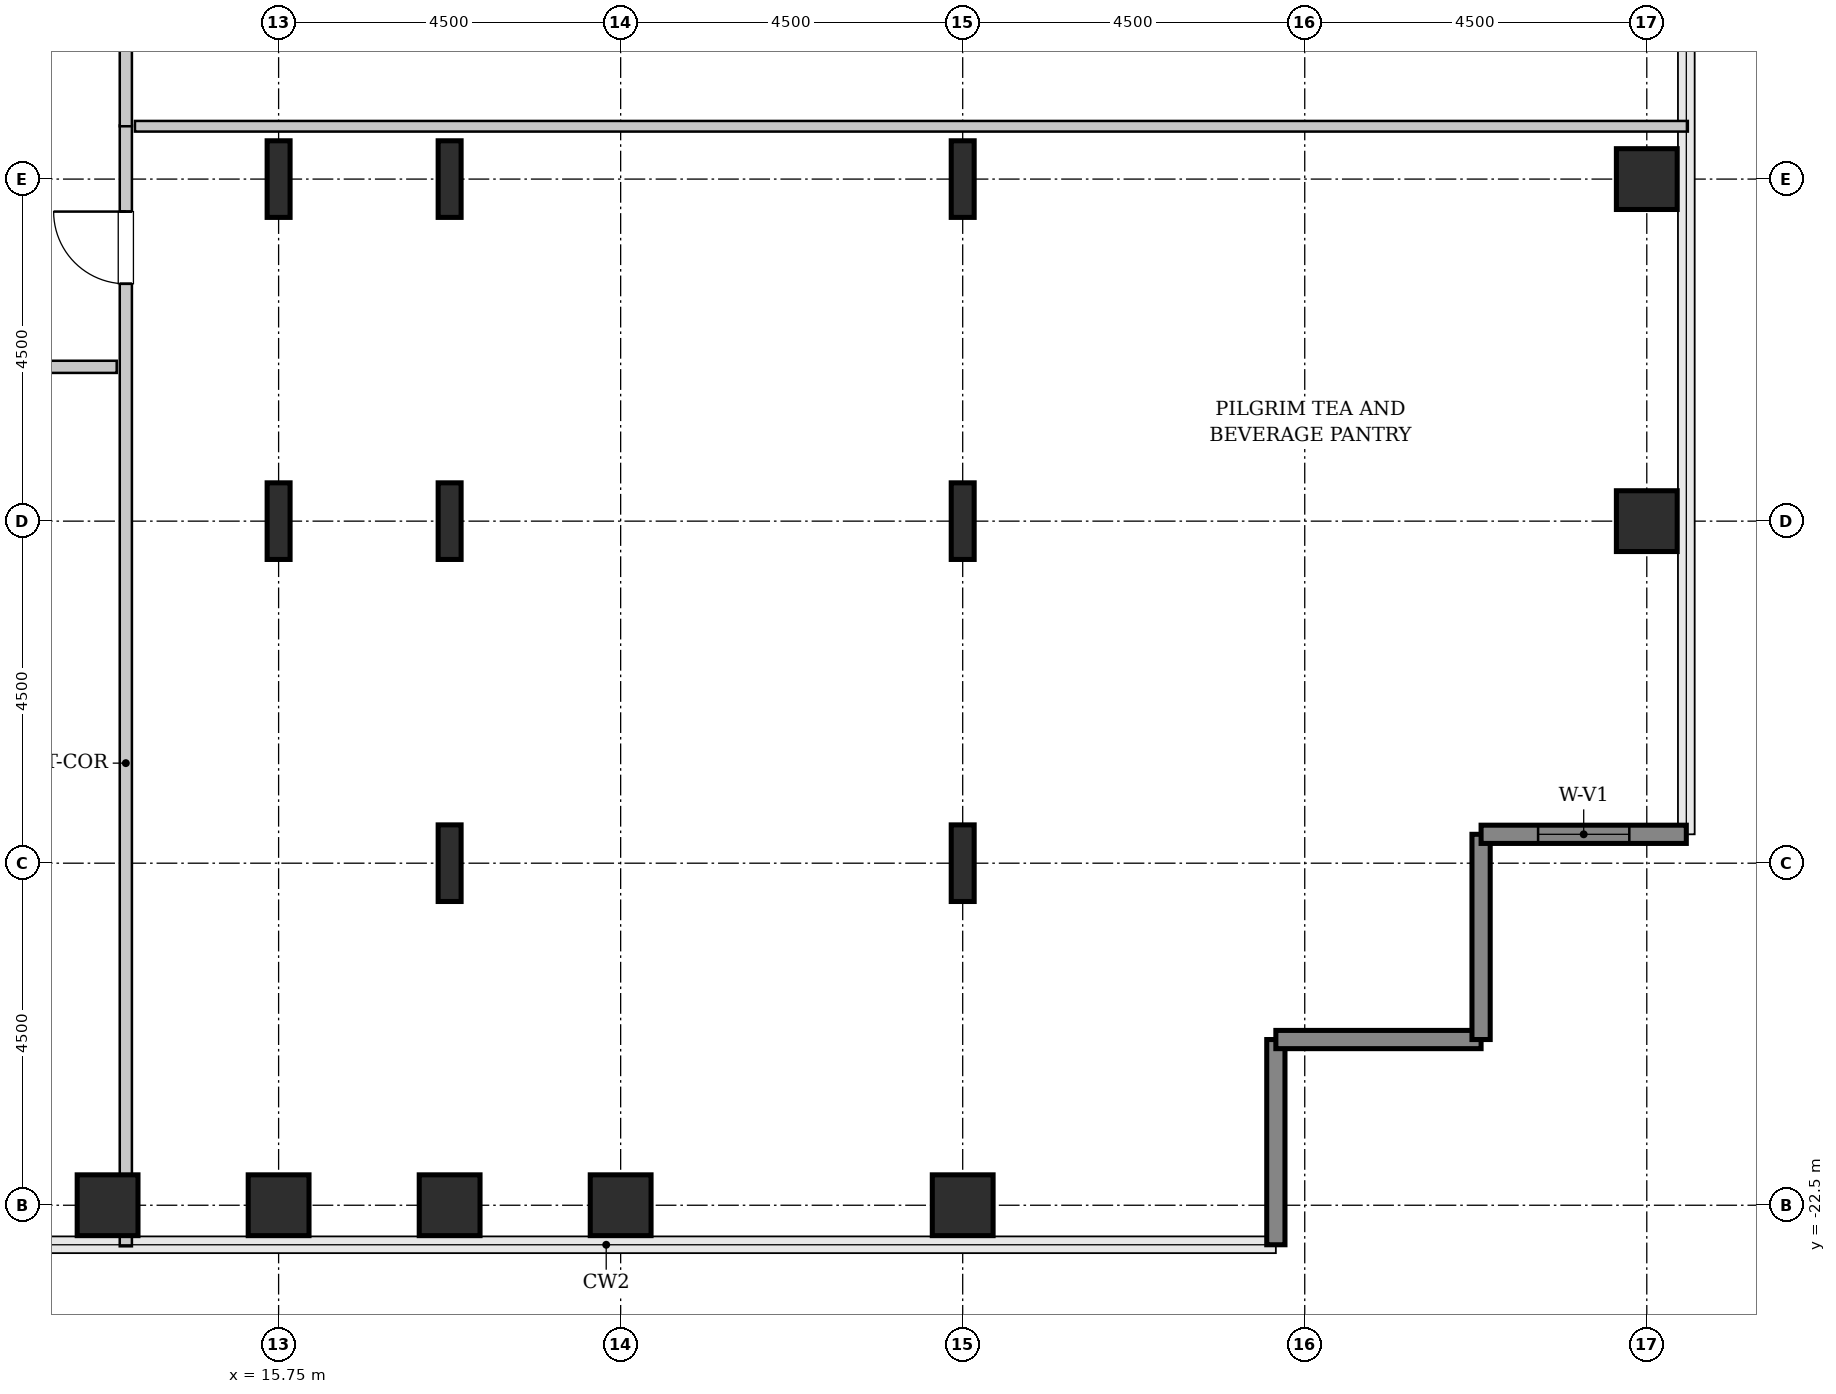
"""IFC4 building model, lengths in metres.
Left out: names, types, materials, properties, quantities, classifications, styles, units other than length and angle.
Written with IfcOpenShell. Run it as: python <this file> out.ifc"""

import sys

from ifc_helpers import new_model, si_unit, direction, frame, frame_2d, origin, origin_2d, place, context, subcontext, project, spatial, rectangle, hollow_rectangle, i_section, extrude, source, transform, mapped, element, fill, save


model = new_model("IFC4")
c1 = context("Model", 3, precision=1e-05, world=origin(), true_north=direction((0.0, 1.0)))
c2 = subcontext(c1, "Body", "Model", "MODEL_VIEW")
j1 = project(units=[si_unit("LENGTHUNIT", "METRE"), si_unit("PLANEANGLEUNIT", "RADIAN")], contexts=[c1])
p1 = place(None, origin())
s1 = spatial("IfcSite", under=j1, at=p1, CompositionType="ELEMENT")
p2 = place(p1, origin())
s2 = spatial("IfcBuilding", under=s1, at=p2, CompositionType="ELEMENT")
p3 = place(p2, frame((0.0, 0.0, 128.8)))
s3 = spatial("IfcBuildingStorey", under=s2, at=p3, CompositionType="ELEMENT", Elevation=128.8)
m1 = source(origin(), c2, "Body", "SweptSolid", [
    extrude(hollow_rectangle(XDim=0.8, YDim=0.8, WallThickness=0.04, InnerFilletRadius=0.04, OuterFilletRadius=0.08, at=origin_2d()), origin(), (0.0, 0.0, 1.0), 3.8),
])
for number, where, z_axis, x_axis in (
    (1, (13.5, -22.5, 0.0), (0.0, 0.0, 1.0), (1.0, 0.0, 0.0)),
    (2, (15.75, -22.5, 0.0), (0.0, 0.0, 1.0), (1.0, 0.0, 0.0)),
):
    element("IfcColumn", number, at=place(p3, frame(where, z_axis=z_axis, x_axis=x_axis)), inside=s3, PredefinedType="COLUMN", context=c2, shape_type="MappedRepresentation", body=[
        mapped(m1, transform((0.0, 0.0, 0.0), x_axis=(1.0, 0.0, 0.0), y_axis=(0.0, 1.0, 0.0), z_axis=(0.0, 0.0, 1.0), scale=1.0)),
    ])
m2 = source(origin(), c2, "Body", "SweptSolid", [
    extrude(i_section(OverallWidth=0.302, OverallDepth=1.008, WebThickness=0.021, FlangeThickness=0.04, FilletRadius=0.03, at=origin_2d()), origin(), (0.0, 0.0, 1.0), 3.8),
])
for number, where, z_axis, x_axis in (
    (3, (15.75, -13.5, 0.0), (0.0, 0.0, 1.0), (1.0, 0.0, 0.0)),
    (4, (15.75, -9.0, 0.0), (0.0, 0.0, 1.0), (1.0, 0.0, 0.0)),
):
    element("IfcColumn", number, at=place(p3, frame(where, z_axis=z_axis, x_axis=x_axis)), inside=s3, PredefinedType="COLUMN", context=c2, shape_type="MappedRepresentation", body=[
        mapped(m2, transform((0.0, 0.0, 0.0), x_axis=(1.0, 0.0, 0.0), y_axis=(0.0, 1.0, 0.0), z_axis=(0.0, 0.0, 1.0), scale=1.0)),
    ])
p4 = place(p3, frame((18.0, -22.5, 0.0), z_axis=(0.0, 0.0, 1.0), x_axis=(1.0, 0.0, 0.0)))
e5 = element("IfcColumn", 5, at=p4, inside=s3, PredefinedType="COLUMN", context=c2, shape_type="MappedRepresentation", body=[
    mapped(m1, transform((0.0, 0.0, 0.0), x_axis=(1.0, 0.0, 0.0), y_axis=(0.0, 1.0, 0.0), z_axis=(0.0, 0.0, 1.0), scale=1.0)),
])
for number, where, z_axis, x_axis in (
    (6, (18.0, -18.0, 0.0), (0.0, 0.0, 1.0), (1.0, 0.0, 0.0)),
    (7, (18.0, -13.5, 0.0), (0.0, 0.0, 1.0), (1.0, 0.0, 0.0)),
    (8, (18.0, -9.0, 0.0), (0.0, 0.0, 1.0), (1.0, 0.0, 0.0)),
):
    element("IfcColumn", number, at=place(p3, frame(where, z_axis=z_axis, x_axis=x_axis)), inside=s3, PredefinedType="COLUMN", context=c2, shape_type="MappedRepresentation", body=[
        mapped(m2, transform((0.0, 0.0, 0.0), x_axis=(1.0, 0.0, 0.0), y_axis=(0.0, 1.0, 0.0), z_axis=(0.0, 0.0, 1.0), scale=1.0)),
    ])
for number, where, z_axis, x_axis in (
    (9, (20.25, -22.5, 0.0), (0.0, 0.0, 1.0), (1.0, 0.0, 0.0)),
    (10, (24.75, -22.5, 0.0), (0.0, 0.0, 1.0), (1.0, 0.0, 0.0)),
):
    element("IfcColumn", number, at=place(p3, frame(where, z_axis=z_axis, x_axis=x_axis)), inside=s3, PredefinedType="COLUMN", context=c2, shape_type="MappedRepresentation", body=[
        mapped(m1, transform((0.0, 0.0, 0.0), x_axis=(1.0, 0.0, 0.0), y_axis=(0.0, 1.0, 0.0), z_axis=(0.0, 0.0, 1.0), scale=1.0)),
    ])
for number, where, z_axis, x_axis in (
    (11, (24.75, -18.0, 0.0), (0.0, 0.0, 1.0), (1.0, 0.0, 0.0)),
    (12, (24.75, -13.5, 0.0), (0.0, 0.0, 1.0), (1.0, 0.0, 0.0)),
    (13, (24.75, -9.0, 0.0), (0.0, 0.0, 1.0), (1.0, 0.0, 0.0)),
):
    element("IfcColumn", number, at=place(p3, frame(where, z_axis=z_axis, x_axis=x_axis)), inside=s3, PredefinedType="COLUMN", context=c2, shape_type="MappedRepresentation", body=[
        mapped(m2, transform((0.0, 0.0, 0.0), x_axis=(1.0, 0.0, 0.0), y_axis=(0.0, 1.0, 0.0), z_axis=(0.0, 0.0, 1.0), scale=1.0)),
    ])
for number, where, z_axis, x_axis in (
    (14, (33.75, -13.5, 0.0), (0.0, 0.0, 1.0), (1.0, 0.0, 0.0)),
    (15, (33.75, -9.0, 0.0), (0.0, 0.0, 1.0), (1.0, 0.0, 0.0)),
):
    element("IfcColumn", number, at=place(p3, frame(where, z_axis=z_axis, x_axis=x_axis)), inside=s3, PredefinedType="COLUMN", context=c2, shape_type="MappedRepresentation", body=[
        mapped(m1, transform((0.0, 0.0, 0.0), x_axis=(1.0, 0.0, 0.0), y_axis=(0.0, 1.0, 0.0), z_axis=(0.0, 0.0, 1.0), scale=1.0)),
    ])
m3 = source(origin(), c2, "Body", "SweptSolid", [
    extrude(rectangle(XDim=2.7, YDim=0.24, at=frame_2d((1.35, 0.0))), origin(), (0.0, 0.0, 1.0), 3.55),
])
for number, where, z_axis, x_axis in (
    (16, (28.87, -23.02, 0.0), (0.0, 0.0, 1.0), (0.0, 1.0, 0.0)),
    (17, (28.87, -20.32, 0.0), (0.0, 0.0, 1.0), (1.0, 0.0, 0.0)),
    (18, (31.57, -20.32, 0.0), (0.0, 0.0, 1.0), (0.0, 1.0, 0.0)),
):
    element("IfcWall", number, at=place(p3, frame(where, z_axis=z_axis, x_axis=x_axis)), inside=s3, PredefinedType="SHEAR", context=c2, shape_type="MappedRepresentation", body=[
        mapped(m3, transform((0.0, 0.0, 0.0), x_axis=(1.0, 0.0, 0.0), y_axis=(0.0, 1.0, 0.0), z_axis=(0.0, 0.0, 1.0), scale=1.0)),
    ])
p5 = place(p3, frame((31.57, -17.62, 0.0), z_axis=(0.0, 0.0, 1.0), x_axis=(1.0, 0.0, 0.0)))
e19 = element("IfcWall", 19, at=p5, inside=s3, PredefinedType="SHEAR", context=c2, shape_type="MappedRepresentation", body=[
    mapped(m3, transform((0.0, 0.0, 0.0), x_axis=(1.0, 0.0, 0.0), y_axis=(0.0, 1.0, 0.0), z_axis=(0.0, 0.0, 1.0), scale=1.0)),
])
p6 = place(p5, frame((0.75, 0.0, 0.85)))
e20 = element("IfcOpeningElement", 20, at=p6, cuts=e19, PredefinedType="OPENING", context=c2, shape_type="SweptSolid", body=[
    extrude(rectangle(XDim=1.2, YDim=1.8, at=frame_2d((0.6, 0.9))), frame((0.0, 0.13, 0.0), z_axis=(0.0, -1.0, 0.0), x_axis=(1.0, 0.0, 0.0)), (0.0, 0.0, 1.0), 0.26),
])
m4 = source(origin(), c2, "Body", "SweptSolid", [
    extrude(rectangle(XDim=14.745, YDim=0.16, at=frame_2d((7.373, 0.0))), origin(), (0.0, 0.0, 1.0), 3.535),
])
p7 = place(p3, frame((13.74, -23.04, 0.0), z_axis=(0.0, 0.0, 1.0), x_axis=(0.0, 1.0, 0.0)))
e21 = element("IfcWall", 21, at=p7, inside=s3, PredefinedType="PARTITIONING", context=c2, shape_type="MappedRepresentation", body=[
    mapped(m4, transform((0.0, 0.0, 0.0), x_axis=(1.0, 0.0, 0.0), y_axis=(0.0, 1.0, 0.0), z_axis=(0.0, 0.0, 1.0), scale=1.0)),
])
p8 = place(p7, frame((12.663, 0.0, 0.0)))
e22 = element("IfcOpeningElement", 22, at=p8, cuts=e21, PredefinedType="OPENING", context=c2, shape_type="SweptSolid", body=[
    extrude(rectangle(XDim=0.95, YDim=2.1, at=frame_2d((0.475, 1.05))), frame((0.0, 0.09, 0.0), z_axis=(0.0, -1.0, 0.0), x_axis=(1.0, 0.0, 0.0)), (0.0, 0.0, 1.0), 0.18),
])
m5 = source(origin(), c2, "Body", "SweptSolid", [
    extrude(rectangle(XDim=20.43, YDim=0.14, at=frame_2d((10.215, 0.0))), origin(), (0.0, 0.0, 1.0), 3.535),
])
p9 = place(p3, frame((13.86, -8.305, 0.0), z_axis=(0.0, 0.0, 1.0), x_axis=(1.0, 0.0, 0.0)))
e23 = element("IfcWall", 23, at=p9, inside=s3, PredefinedType="PARTITIONING", context=c2, shape_type="MappedRepresentation", body=[
    mapped(m5, transform((0.0, 0.0, 0.0), x_axis=(1.0, 0.0, 0.0), y_axis=(0.0, 1.0, 0.0), z_axis=(0.0, 0.0, 1.0), scale=1.0)),
])
m6 = source(origin(), c2, "Body", "SweptSolid", [
    extrude(rectangle(XDim=3.51, YDim=0.16, at=frame_2d((1.755, 0.0))), origin(), (0.0, 0.0, 1.0), 3.535),
])
p10 = place(p3, frame((13.74, -8.305, 0.0), z_axis=(0.0, 0.0, 1.0), x_axis=(0.0, 1.0, 0.0)))
e24 = element("IfcWall", 24, at=p10, inside=s3, PredefinedType="PARTITIONING", context=c2, shape_type="MappedRepresentation", body=[
    mapped(m6, transform((0.0, 0.0, 0.0), x_axis=(1.0, 0.0, 0.0), y_axis=(0.0, 1.0, 0.0), z_axis=(0.0, 0.0, 1.0), scale=1.0)),
])
p11 = place(p10, frame((1.28, 0.0, 0.0)))
e25 = element("IfcOpeningElement", 25, at=p11, cuts=e24, PredefinedType="OPENING", context=c2, shape_type="SweptSolid", body=[
    extrude(rectangle(XDim=0.95, YDim=2.1, at=frame_2d((0.475, 1.05))), frame((0.0, 0.09, 0.0), z_axis=(0.0, -1.0, 0.0), x_axis=(1.0, 0.0, 0.0)), (0.0, 0.0, 1.0), 0.18),
])
m7 = source(origin(), c2, "Body", "SweptSolid", [
    extrude(rectangle(XDim=4.36, YDim=0.16, at=frame_2d((2.18, 0.0))), origin(), (0.0, 0.0, 1.0), 3.535),
])
p12 = place(p3, frame((9.26, -11.47, 0.0), z_axis=(0.0, 0.0, 1.0), x_axis=(1.0, 0.0, 0.0)))
e26 = element("IfcWall", 26, at=p12, inside=s3, PredefinedType="PARTITIONING", context=c2, shape_type="MappedRepresentation", body=[
    mapped(m7, transform((0.0, 0.0, 0.0), x_axis=(1.0, 0.0, 0.0), y_axis=(0.0, 1.0, 0.0), z_axis=(0.0, 0.0, 1.0), scale=1.0)),
])
p13 = place(p12, frame((1.705, 0.0, 0.0)))
e27 = element("IfcOpeningElement", 27, at=p13, cuts=e26, PredefinedType="OPENING", context=c2, shape_type="SweptSolid", body=[
    extrude(rectangle(XDim=0.95, YDim=2.1, at=frame_2d((0.475, 1.05))), frame((0.0, 0.09, 0.0), z_axis=(0.0, -1.0, 0.0), x_axis=(1.0, 0.0, 0.0)), (0.0, 0.0, 1.0), 0.18),
])
m8 = source(origin(), c2, "Body", "SweptSolid", [
    extrude(rectangle(XDim=1.2, YDim=1.8, at=frame_2d((0.6, 0.9))), frame((0.0, 0.03, 0.0), z_axis=(0.0, -1.0, 0.0), x_axis=(1.0, 0.0, 0.0)), (0.0, 0.0, 1.0), 0.06),
])
p14 = place(p6, origin())
e28 = element("IfcWindow", 28, at=p14, inside=s3, PartitioningType="SINGLE_PANEL", PredefinedType="WINDOW", context=c2, shape_type="MappedRepresentation", body=[
    mapped(m8, transform((0.0, 0.0, 0.0), x_axis=(1.0, 0.0, 0.0), y_axis=(0.0, 1.0, 0.0), z_axis=(0.0, 0.0, 1.0), scale=1.0)),
])
fill(e20, e28)
m9 = source(origin(), c2, "Body", "SweptSolid", [
    extrude(rectangle(XDim=0.95, YDim=2.1, at=frame_2d((0.475, 1.05))), frame((0.0, 0.025, 0.0), z_axis=(0.0, -1.0, 0.0), x_axis=(1.0, 0.0, 0.0)), (0.0, 0.0, 1.0), 0.05),
])
p15 = place(p8, origin())
e29 = element("IfcDoor", 29, at=p15, inside=s3, OperationType="SINGLE_SWING_RIGHT", PredefinedType="DOOR", context=c2, shape_type="MappedRepresentation", body=[
    mapped(m9, transform((0.0, 0.0, 0.0), x_axis=(1.0, 0.0, 0.0), y_axis=(0.0, 1.0, 0.0), z_axis=(0.0, 0.0, 1.0), scale=1.0)),
])
fill(e22, e29)
save(model, sys.argv[1])
